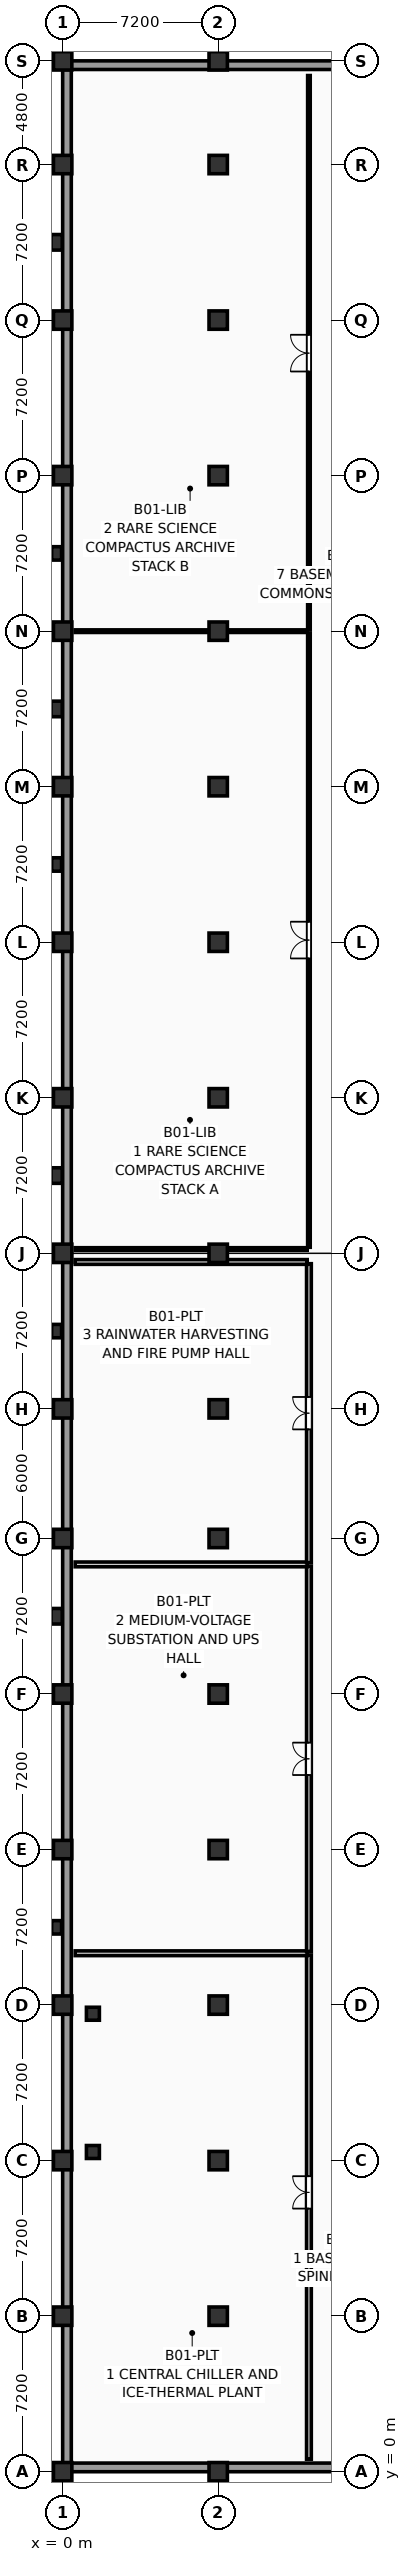
"""IFC4 building model, lengths in metres.
Left out: names, types, materials, properties, quantities, classifications, styles, units other than length and angle.
Written with IfcOpenShell. Run it as: python <this file> out.ifc"""

import sys

from ifc_helpers import new_model, si_unit, direction, frame, frame_2d, origin, origin_2d, place, context, subcontext, project, spatial, rectangle, extrude, element, fill, save


model = new_model("IFC4")
c1 = context("Model", 3, precision=1e-05, world=origin(), true_north=direction((0.0, 1.0)))
c2 = subcontext(c1, "Body", "Model", "MODEL_VIEW")
j1 = project(units=[si_unit("LENGTHUNIT", "METRE"), si_unit("PLANEANGLEUNIT", "RADIAN")], contexts=[c1])
p1 = place(None, origin())
s1 = spatial("IfcSite", under=j1, at=p1, CompositionType="ELEMENT")
p2 = place(p1, origin())
s2 = spatial("IfcBuilding", under=s1, at=p2, CompositionType="ELEMENT")
p3 = place(p2, frame((0.0, 0.0, -4.5)))
s3 = spatial("IfcBuildingStorey", under=s2, at=p3, CompositionType="ELEMENT", Elevation=-4.5)
for number, where, z_axis, x_axis in (
    (1, (0.0, 0.0, -0.3), (0.0, 0.0, 1.0), (1.0, 0.0, 0.0)),
    (2, (0.0, 7.2, -0.3), (0.0, 0.0, 1.0), (1.0, 0.0, 0.0)),
    (3, (0.0, 14.4, -0.3), (0.0, 0.0, 1.0), (1.0, 0.0, 0.0)),
    (4, (0.0, 21.6, -0.3), (0.0, 0.0, 1.0), (1.0, 0.0, 0.0)),
    (5, (0.0, 28.8, -0.3), (0.0, 0.0, 1.0), (1.0, 0.0, 0.0)),
    (6, (0.0, 36.0, -0.3), (0.0, 0.0, 1.0), (1.0, 0.0, 0.0)),
    (7, (0.0, 43.2, -0.3), (0.0, 0.0, 1.0), (1.0, 0.0, 0.0)),
    (8, (0.0, 49.2, -0.3), (0.0, 0.0, 1.0), (1.0, 0.0, 0.0)),
    (9, (0.0, 56.4, -0.3), (0.0, 0.0, 1.0), (1.0, 0.0, 0.0)),
):
    element("IfcColumn", number, at=place(p3, frame(where, z_axis=z_axis, x_axis=x_axis)), inside=s3, PredefinedType="COLUMN", context=c2, shape_type="SweptSolid", body=[
        extrude(rectangle(XDim=0.85, YDim=0.85, at=origin_2d()), origin(), (0.0, 0.0, 1.0), 4.8),
    ])
for number, where, z_axis, x_axis in (
    (10, (0.0, 63.6, -0.28), (0.0, 0.0, 1.0), (1.0, 0.0, 0.0)),
    (11, (0.0, 70.8, -0.28), (0.0, 0.0, 1.0), (1.0, 0.0, 0.0)),
    (12, (0.0, 78.0, -0.28), (0.0, 0.0, 1.0), (1.0, 0.0, 0.0)),
    (13, (0.0, 85.2, -0.28), (0.0, 0.0, 1.0), (1.0, 0.0, 0.0)),
    (14, (0.0, 92.4, -0.28), (0.0, 0.0, 1.0), (1.0, 0.0, 0.0)),
    (15, (0.0, 99.6, -0.28), (0.0, 0.0, 1.0), (1.0, 0.0, 0.0)),
    (16, (0.0, 106.8, -0.28), (0.0, 0.0, 1.0), (1.0, 0.0, 0.0)),
    (17, (0.0, 111.6, -0.28), (0.0, 0.0, 1.0), (1.0, 0.0, 0.0)),
):
    element("IfcColumn", number, at=place(p3, frame(where, z_axis=z_axis, x_axis=x_axis)), inside=s3, PredefinedType="COLUMN", context=c2, shape_type="SweptSolid", body=[
        extrude(rectangle(XDim=0.85, YDim=0.85, at=origin_2d()), origin(), (0.0, 0.0, 1.0), 4.78),
    ])
for number, where, z_axis, x_axis in (
    (18, (7.2, 0.0, -0.3), (0.0, 0.0, 1.0), (1.0, 0.0, 0.0)),
    (19, (7.2, 7.2, -0.3), (0.0, 0.0, 1.0), (1.0, 0.0, 0.0)),
    (20, (7.2, 14.4, -0.3), (0.0, 0.0, 1.0), (1.0, 0.0, 0.0)),
    (21, (7.2, 21.6, -0.3), (0.0, 0.0, 1.0), (1.0, 0.0, 0.0)),
    (22, (7.2, 28.8, -0.3), (0.0, 0.0, 1.0), (1.0, 0.0, 0.0)),
    (23, (7.2, 36.0, -0.3), (0.0, 0.0, 1.0), (1.0, 0.0, 0.0)),
    (24, (7.2, 43.2, -0.3), (0.0, 0.0, 1.0), (1.0, 0.0, 0.0)),
    (25, (7.2, 49.2, -0.3), (0.0, 0.0, 1.0), (1.0, 0.0, 0.0)),
    (26, (7.2, 56.4, -0.3), (0.0, 0.0, 1.0), (1.0, 0.0, 0.0)),
):
    element("IfcColumn", number, at=place(p3, frame(where, z_axis=z_axis, x_axis=x_axis)), inside=s3, PredefinedType="COLUMN", context=c2, shape_type="SweptSolid", body=[
        extrude(rectangle(XDim=0.85, YDim=0.85, at=origin_2d()), origin(), (0.0, 0.0, 1.0), 4.8),
    ])
for number, where, z_axis, x_axis in (
    (27, (7.2, 63.6, -0.28), (0.0, 0.0, 1.0), (1.0, 0.0, 0.0)),
    (28, (7.2, 70.8, -0.28), (0.0, 0.0, 1.0), (1.0, 0.0, 0.0)),
    (29, (7.2, 78.0, -0.28), (0.0, 0.0, 1.0), (1.0, 0.0, 0.0)),
    (30, (7.2, 85.2, -0.28), (0.0, 0.0, 1.0), (1.0, 0.0, 0.0)),
    (31, (7.2, 92.4, -0.28), (0.0, 0.0, 1.0), (1.0, 0.0, 0.0)),
    (32, (7.2, 99.6, -0.28), (0.0, 0.0, 1.0), (1.0, 0.0, 0.0)),
    (33, (7.2, 106.8, -0.28), (0.0, 0.0, 1.0), (1.0, 0.0, 0.0)),
    (34, (7.2, 111.6, -0.28), (0.0, 0.0, 1.0), (1.0, 0.0, 0.0)),
):
    element("IfcColumn", number, at=place(p3, frame(where, z_axis=z_axis, x_axis=x_axis)), inside=s3, PredefinedType="COLUMN", context=c2, shape_type="SweptSolid", body=[
        extrude(rectangle(XDim=0.85, YDim=0.85, at=origin_2d()), origin(), (0.0, 0.0, 1.0), 4.78),
    ])
for number, where, z_axis, x_axis in (
    (35, (1.4, 14.8, -0.3), (0.0, 0.0, 1.0), (1.0, 0.0, 0.0)),
    (36, (1.4, 21.2, -0.3), (0.0, 0.0, 1.0), (1.0, 0.0, 0.0)),
):
    element("IfcColumn", number, at=place(p3, frame(where, z_axis=z_axis, x_axis=x_axis)), inside=s3, PredefinedType="COLUMN", context=c2, shape_type="SweptSolid", body=[
        extrude(rectangle(XDim=0.6, YDim=0.6, at=origin_2d()), origin(), (0.0, 0.0, 1.0), 4.8),
    ])
p4 = place(p3, frame((-0.28, 25.2, -0.3), z_axis=(0.0, 0.0, 1.0), x_axis=(1.0, 0.0, 0.0)))
e37 = element("IfcColumn", 37, at=p4, inside=s3, PredefinedType="PILASTER", context=c2, shape_type="SweptSolid", body=[
    extrude(rectangle(XDim=0.46, YDim=0.62, at=origin_2d()), origin(), (0.0, 0.0, 1.0), 4.8),
])
p5 = place(p3, frame((-0.28, 39.6, -0.3), z_axis=(0.0, 0.0, 1.0), x_axis=(1.0, 0.0, 0.0)))
e38 = element("IfcColumn", 38, at=p5, inside=s3, PredefinedType="PILASTER", context=c2, shape_type="SweptSolid", body=[
    extrude(rectangle(XDim=0.52, YDim=0.72, at=origin_2d()), origin(), (0.0, 0.0, 1.0), 4.8),
])
p6 = place(p3, frame((-0.28, 52.8, -0.3), z_axis=(0.0, 0.0, 1.0), x_axis=(1.0, 0.0, 0.0)))
e39 = element("IfcColumn", 39, at=p6, inside=s3, PredefinedType="PILASTER", context=c2, shape_type="SweptSolid", body=[
    extrude(rectangle(XDim=0.46, YDim=0.62, at=origin_2d()), origin(), (0.0, 0.0, 1.0), 4.8),
])
p7 = place(p3, frame((-0.28, 60.0, -0.28), z_axis=(0.0, 0.0, 1.0), x_axis=(1.0, 0.0, 0.0)))
e40 = element("IfcColumn", 40, at=p7, inside=s3, PredefinedType="PILASTER", context=c2, shape_type="SweptSolid", body=[
    extrude(rectangle(XDim=0.52, YDim=0.72, at=origin_2d()), origin(), (0.0, 0.0, 1.0), 4.78),
])
p8 = place(p3, frame((-0.28, 74.4, -0.28), z_axis=(0.0, 0.0, 1.0), x_axis=(1.0, 0.0, 0.0)))
e41 = element("IfcColumn", 41, at=p8, inside=s3, PredefinedType="PILASTER", context=c2, shape_type="SweptSolid", body=[
    extrude(rectangle(XDim=0.46, YDim=0.62, at=origin_2d()), origin(), (0.0, 0.0, 1.0), 4.78),
])
p9 = place(p3, frame((-0.28, 81.6, -0.28), z_axis=(0.0, 0.0, 1.0), x_axis=(1.0, 0.0, 0.0)))
e42 = element("IfcColumn", 42, at=p9, inside=s3, PredefinedType="PILASTER", context=c2, shape_type="SweptSolid", body=[
    extrude(rectangle(XDim=0.52, YDim=0.72, at=origin_2d()), origin(), (0.0, 0.0, 1.0), 4.78),
])
p10 = place(p3, frame((-0.28, 88.8, -0.28), z_axis=(0.0, 0.0, 1.0), x_axis=(1.0, 0.0, 0.0)))
e43 = element("IfcColumn", 43, at=p10, inside=s3, PredefinedType="PILASTER", context=c2, shape_type="SweptSolid", body=[
    extrude(rectangle(XDim=0.46, YDim=0.62, at=origin_2d()), origin(), (0.0, 0.0, 1.0), 4.78),
])
p11 = place(p3, frame((-0.28, 103.2, -0.28), z_axis=(0.0, 0.0, 1.0), x_axis=(1.0, 0.0, 0.0)))
e44 = element("IfcColumn", 44, at=p11, inside=s3, PredefinedType="PILASTER", context=c2, shape_type="SweptSolid", body=[
    extrude(rectangle(XDim=0.52, YDim=0.72, at=origin_2d()), origin(), (0.0, 0.0, 1.0), 4.78),
])
p12 = place(p3, frame((28.8, 0.2, -0.3), z_axis=(0.0, 0.0, 1.0), x_axis=(-1.0, 0.0, 0.0)))
e45 = element("IfcWall", 45, at=p12, inside=s3, PredefinedType="USERDEFINED", context=c2, shape_type="SweptSolid", body=[
    extrude(rectangle(XDim=28.8, YDim=0.4, at=frame_2d((14.4, 0.0))), origin(), (0.0, 0.0, 1.0), 4.54),
])
p13 = place(p3, frame((0.2, 0.0, -0.3), z_axis=(0.0, 0.0, 1.0), x_axis=(0.0, 1.0, 0.0)))
e46 = element("IfcWall", 46, at=p13, inside=s3, PredefinedType="USERDEFINED", context=c2, shape_type="SweptSolid", body=[
    extrude(rectangle(XDim=56.4, YDim=0.4, at=frame_2d((28.2, 0.0))), origin(), (0.0, 0.0, 1.0), 4.54),
])
p14 = place(p3, frame((0.2, 56.4, -0.3), z_axis=(0.0, 0.0, 1.0), x_axis=(0.0, 1.0, 0.0)))
e47 = element("IfcWall", 47, at=p14, inside=s3, PredefinedType="USERDEFINED", context=c2, shape_type="SweptSolid", body=[
    extrude(rectangle(XDim=28.8, YDim=0.4, at=frame_2d((14.4, 0.0))), origin(), (0.0, 0.0, 1.0), 4.54),
])
p15 = place(p3, frame((0.2, 85.2, -0.3), z_axis=(0.0, 0.0, 1.0), x_axis=(0.0, 1.0, 0.0)))
e48 = element("IfcWall", 48, at=p15, inside=s3, PredefinedType="USERDEFINED", context=c2, shape_type="SweptSolid", body=[
    extrude(rectangle(XDim=26.4, YDim=0.4, at=frame_2d((13.2, 0.0))), origin(), (0.0, 0.0, 1.0), 4.54),
])
p16 = place(p3, frame((0.0, 111.4, -0.3), z_axis=(0.0, 0.0, 1.0), x_axis=(1.0, 0.0, 0.0)))
e49 = element("IfcWall", 49, at=p16, inside=s3, PredefinedType="USERDEFINED", context=c2, shape_type="SweptSolid", body=[
    extrude(rectangle(XDim=21.6, YDim=0.4, at=frame_2d((10.8, 0.0))), origin(), (0.0, 0.0, 1.0), 4.54),
])
p17 = place(p3, frame((11.4, 0.58, 0.0), z_axis=(0.0, 0.0, 1.0), x_axis=(0.0, 1.0, 0.0)))
e50 = element("IfcWall", 50, at=p17, inside=s3, PredefinedType="PARTITIONING", context=c2, shape_type="SweptSolid", body=[
    extrude(rectangle(XDim=23.34, YDim=0.22, at=frame_2d((11.67, 0.0))), origin(), (0.0, 0.0, 1.0), 4.225),
])
p18 = place(p17, frame((11.6, 0.0, 0.0)))
e51 = element("IfcOpeningElement", 51, at=p18, cuts=e50, PredefinedType="OPENING", context=c2, shape_type="SweptSolid", body=[
    extrude(rectangle(XDim=1.5, YDim=2.25, at=frame_2d((0.75, 1.125))), frame((0.0, 0.122, 0.0), z_axis=(0.0, -1.0, 0.0), x_axis=(1.0, 0.0, 0.0)), (0.0, 0.0, 1.0), 0.244),
])
p19 = place(p3, frame((0.58, 24.0, 0.0), z_axis=(0.0, 0.0, 1.0), x_axis=(1.0, 0.0, 0.0)))
e52 = element("IfcWall", 52, at=p19, inside=s3, PredefinedType="PARTITIONING", context=c2, shape_type="SweptSolid", body=[
    extrude(rectangle(XDim=10.74, YDim=0.22, at=frame_2d((5.37, 0.0))), origin(), (0.0, 0.0, 1.0), 4.225),
])
p20 = place(p3, frame((11.4, 24.08, 0.0), z_axis=(0.0, 0.0, 1.0), x_axis=(0.0, 1.0, 0.0)))
e53 = element("IfcWall", 53, at=p20, inside=s3, PredefinedType="PARTITIONING", context=c2, shape_type="SweptSolid", body=[
    extrude(rectangle(XDim=17.84, YDim=0.22, at=frame_2d((8.92, 0.0))), origin(), (0.0, 0.0, 1.0), 4.225),
])
p21 = place(p20, frame((8.17, 0.0, 0.0)))
e54 = element("IfcOpeningElement", 54, at=p21, cuts=e53, PredefinedType="OPENING", context=c2, shape_type="SweptSolid", body=[
    extrude(rectangle(XDim=1.5, YDim=2.25, at=frame_2d((0.75, 1.125))), frame((0.0, 0.122, 0.0), z_axis=(0.0, -1.0, 0.0), x_axis=(1.0, 0.0, 0.0)), (0.0, 0.0, 1.0), 0.244),
])
p22 = place(p3, frame((0.58, 42.0, 0.0), z_axis=(0.0, 0.0, 1.0), x_axis=(1.0, 0.0, 0.0)))
e55 = element("IfcWall", 55, at=p22, inside=s3, PredefinedType="PARTITIONING", context=c2, shape_type="SweptSolid", body=[
    extrude(rectangle(XDim=10.74, YDim=0.22, at=frame_2d((5.37, 0.0))), origin(), (0.0, 0.0, 1.0), 4.225),
])
p23 = place(p3, frame((11.4, 42.08, 0.0), z_axis=(0.0, 0.0, 1.0), x_axis=(0.0, 1.0, 0.0)))
e56 = element("IfcWall", 56, at=p23, inside=s3, PredefinedType="PARTITIONING", context=c2, shape_type="SweptSolid", body=[
    extrude(rectangle(XDim=13.84, YDim=0.22, at=frame_2d((6.92, 0.0))), origin(), (0.0, 0.0, 1.0), 4.225),
])
p24 = place(p23, frame((6.17, 0.0, 0.0)))
e57 = element("IfcOpeningElement", 57, at=p24, cuts=e56, PredefinedType="OPENING", context=c2, shape_type="SweptSolid", body=[
    extrude(rectangle(XDim=1.5, YDim=2.25, at=frame_2d((0.75, 1.125))), frame((0.0, 0.122, 0.0), z_axis=(0.0, -1.0, 0.0), x_axis=(1.0, 0.0, 0.0)), (0.0, 0.0, 1.0), 0.244),
])
p25 = place(p3, frame((0.58, 56.0, 0.0), z_axis=(0.0, 0.0, 1.0), x_axis=(1.0, 0.0, 0.0)))
e58 = element("IfcWall", 58, at=p25, inside=s3, PredefinedType="PARTITIONING", context=c2, shape_type="SweptSolid", body=[
    extrude(rectangle(XDim=10.74, YDim=0.22, at=frame_2d((5.37, 0.0))), origin(), (0.0, 0.0, 1.0), 3.375),
])
p26 = place(p3, frame((0.58, 56.6, 0.0), z_axis=(0.0, 0.0, 1.0), x_axis=(1.0, 0.0, 0.0)))
e59 = element("IfcWall", 59, at=p26, inside=s3, PredefinedType="PARTITIONING", context=c2, shape_type="SweptSolid", body=[
    extrude(rectangle(XDim=10.74, YDim=0.12, at=frame_2d((5.37, 0.0))), origin(), (0.0, 0.0, 1.0), 3.375),
])
p27 = place(p3, frame((11.4, 56.68, 0.0), z_axis=(0.0, 0.0, 1.0), x_axis=(0.0, 1.0, 0.0)))
e60 = element("IfcWall", 60, at=p27, inside=s3, PredefinedType="PARTITIONING", context=c2, shape_type="SweptSolid", body=[
    extrude(rectangle(XDim=28.44, YDim=0.12, at=frame_2d((14.22, 0.0))), origin(), (0.0, 0.0, 1.0), 4.225),
])
p28 = place(p27, frame((13.37, 0.0, 0.0)))
e61 = element("IfcOpeningElement", 61, at=p28, cuts=e60, PredefinedType="OPENING", context=c2, shape_type="SweptSolid", body=[
    extrude(rectangle(XDim=1.7, YDim=2.28, at=frame_2d((0.85, 1.14))), frame((0.0, 0.072, 0.0), z_axis=(0.0, -1.0, 0.0), x_axis=(1.0, 0.0, 0.0)), (0.0, 0.0, 1.0), 0.144),
])
p29 = place(p3, frame((0.58, 85.2, 0.0), z_axis=(0.0, 0.0, 1.0), x_axis=(1.0, 0.0, 0.0)))
e62 = element("IfcWall", 62, at=p29, inside=s3, PredefinedType="PARTITIONING", context=c2, shape_type="SweptSolid", body=[
    extrude(rectangle(XDim=10.74, YDim=0.12, at=frame_2d((5.37, 0.0))), origin(), (0.0, 0.0, 1.0), 3.375),
])
p30 = place(p3, frame((11.4, 85.28, 0.0), z_axis=(0.0, 0.0, 1.0), x_axis=(0.0, 1.0, 0.0)))
e63 = element("IfcWall", 63, at=p30, inside=s3, PredefinedType="PARTITIONING", context=c2, shape_type="SweptSolid", body=[
    extrude(rectangle(XDim=25.64, YDim=0.12, at=frame_2d((12.82, 0.0))), origin(), (0.0, 0.0, 1.0), 4.225),
])
p31 = place(p30, frame((11.94, 0.0, 0.0)))
e64 = element("IfcOpeningElement", 64, at=p31, cuts=e63, PredefinedType="OPENING", context=c2, shape_type="SweptSolid", body=[
    extrude(rectangle(XDim=1.7, YDim=2.28, at=frame_2d((0.85, 1.14))), frame((0.0, 0.072, 0.0), z_axis=(0.0, -1.0, 0.0), x_axis=(1.0, 0.0, 0.0)), (0.0, 0.0, 1.0), 0.144),
])
p32 = place(p18, origin())
e65 = element("IfcDoor", 65, at=p32, inside=s3, OperationType="DOUBLE_DOOR_SINGLE_SWING", PredefinedType="DOOR", context=c2, shape_type="SweptSolid", body=[
    extrude(rectangle(XDim=1.5, YDim=2.25, at=frame_2d((0.75, 1.125))), frame((0.0, 0.025, 0.0), z_axis=(0.0, -1.0, 0.0), x_axis=(1.0, 0.0, 0.0)), (0.0, 0.0, 1.0), 0.05),
])
fill(e51, e65)
p33 = place(p21, origin())
e66 = element("IfcDoor", 66, at=p33, inside=s3, OperationType="DOUBLE_DOOR_SINGLE_SWING", PredefinedType="DOOR", context=c2, shape_type="SweptSolid", body=[
    extrude(rectangle(XDim=1.5, YDim=2.25, at=frame_2d((0.75, 1.125))), frame((0.0, 0.025, 0.0), z_axis=(0.0, -1.0, 0.0), x_axis=(1.0, 0.0, 0.0)), (0.0, 0.0, 1.0), 0.05),
])
fill(e54, e66)
p34 = place(p24, origin())
e67 = element("IfcDoor", 67, at=p34, inside=s3, OperationType="DOUBLE_DOOR_SINGLE_SWING", PredefinedType="DOOR", context=c2, shape_type="SweptSolid", body=[
    extrude(rectangle(XDim=1.5, YDim=2.25, at=frame_2d((0.75, 1.125))), frame((0.0, 0.025, 0.0), z_axis=(0.0, -1.0, 0.0), x_axis=(1.0, 0.0, 0.0)), (0.0, 0.0, 1.0), 0.05),
])
fill(e57, e67)
p35 = place(p28, origin())
e68 = element("IfcDoor", 68, at=p35, inside=s3, OperationType="DOUBLE_DOOR_SINGLE_SWING", PredefinedType="DOOR", context=c2, shape_type="SweptSolid", body=[
    extrude(rectangle(XDim=1.7, YDim=2.28, at=frame_2d((0.85, 1.14))), frame((0.0, 0.025, 0.0), z_axis=(0.0, -1.0, 0.0), x_axis=(1.0, 0.0, 0.0)), (0.0, 0.0, 1.0), 0.05),
])
fill(e61, e68)
p36 = place(p31, origin())
e69 = element("IfcDoor", 69, at=p36, inside=s3, OperationType="DOUBLE_DOOR_SINGLE_SWING", PredefinedType="DOOR", context=c2, shape_type="SweptSolid", body=[
    extrude(rectangle(XDim=1.7, YDim=2.28, at=frame_2d((0.85, 1.14))), frame((0.0, 0.025, 0.0), z_axis=(0.0, -1.0, 0.0), x_axis=(1.0, 0.0, 0.0)), (0.0, 0.0, 1.0), 0.05),
])
fill(e64, e69)
save(model, sys.argv[1])
